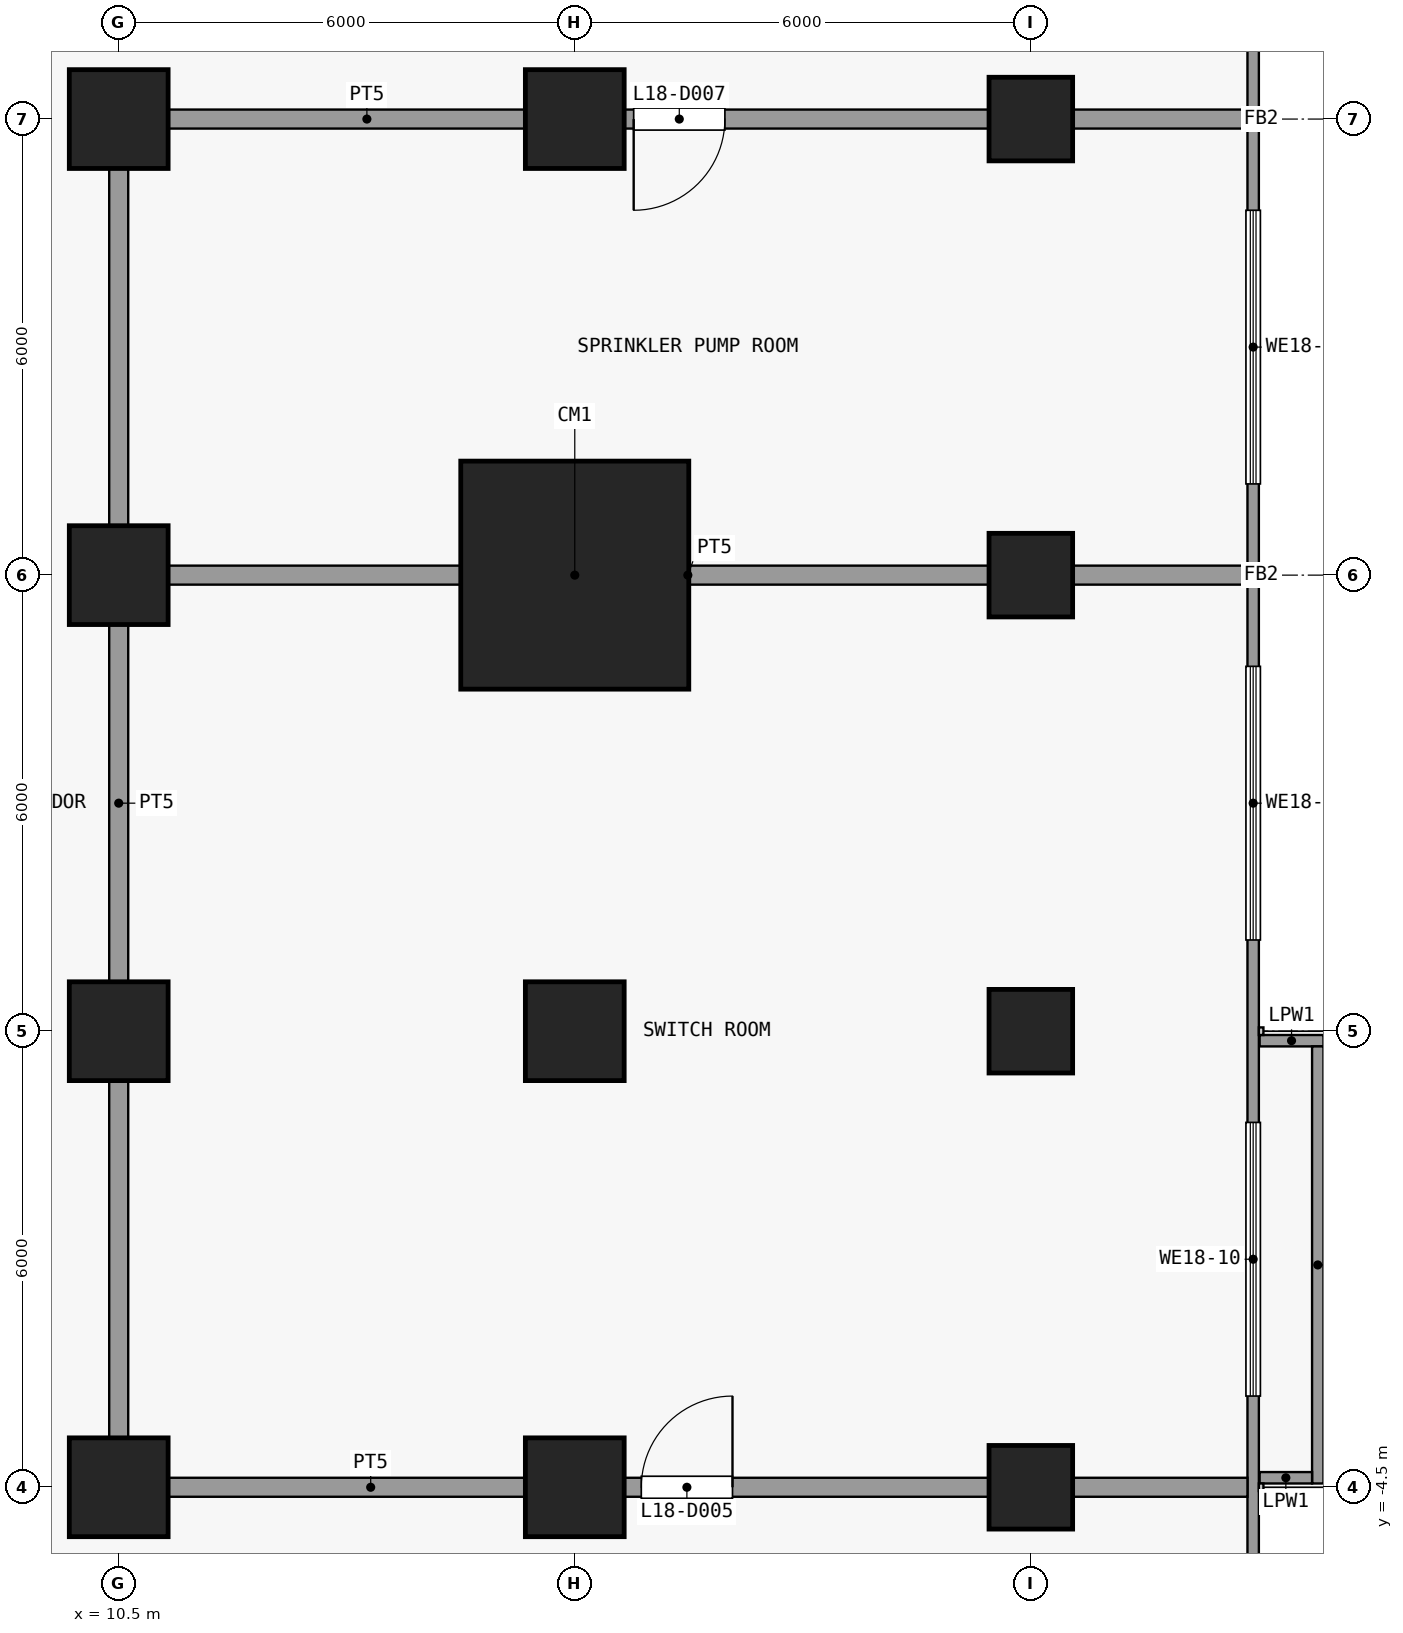
"""IFC4 building model, lengths in metres.
Left out: names, types, materials, properties, quantities, classifications, styles, units other than length and angle.
Written with IfcOpenShell. Run it as: python <this file> out.ifc"""

import sys

from ifc_helpers import new_model, si_unit, direction, frame, frame_2d, origin, origin_2d, place, context, subcontext, project, spatial, rectangle, extrude, element, fill, save


model = new_model("IFC4")
c1 = context("Model", 3, precision=1e-05, world=origin(), true_north=direction((0.0, 1.0)))
c2 = subcontext(c1, "Body", "Model", "MODEL_VIEW")
j1 = project(units=[si_unit("LENGTHUNIT", "METRE"), si_unit("PLANEANGLEUNIT", "RADIAN")], contexts=[c1])
p1 = place(None, origin())
s1 = spatial("IfcSite", under=j1, at=p1, CompositionType="ELEMENT")
p2 = place(p1, origin())
s2 = spatial("IfcBuilding", under=s1, at=p2, CompositionType="ELEMENT")
p3 = place(p2, frame((0.0, 0.0, 75.7)))
s3 = spatial("IfcBuildingStorey", under=s2, at=p3, CompositionType="ELEMENT", Elevation=75.7)
for number, where, z_axis, x_axis in (
    (1, (10.5, -4.5, 0.0), (0.0, 0.0, 1.0), (1.0, 0.0, 0.0)),
    (2, (10.5, 1.5, 0.0), (0.0, 0.0, 1.0), (1.0, 0.0, 0.0)),
    (3, (10.5, 7.5, 0.0), (0.0, 0.0, 1.0), (1.0, 0.0, 0.0)),
    (4, (10.5, 13.5, 0.0), (0.0, 0.0, 1.0), (1.0, 0.0, 0.0)),
    (5, (16.5, -4.5, 0.0), (0.0, 0.0, 1.0), (1.0, 0.0, 0.0)),
    (6, (16.5, 1.5, 0.0), (0.0, 0.0, 1.0), (1.0, 0.0, 0.0)),
):
    element("IfcColumn", number, at=place(p3, frame(where, z_axis=z_axis, x_axis=x_axis)), inside=s3, PredefinedType="COLUMN", context=c2, shape_type="SweptSolid", body=[
        extrude(rectangle(XDim=1.3, YDim=1.3, at=origin_2d()), origin(), (0.0, 0.0, 1.0), 5.4),
    ])
p4 = place(p3, frame((16.5, 7.5, 0.0), z_axis=(0.0, 0.0, 1.0), x_axis=(1.0, 0.0, 0.0)))
e7 = element("IfcColumn", 7, at=p4, inside=s3, PredefinedType="COLUMN", context=c2, shape_type="SweptSolid", body=[
    extrude(rectangle(XDim=3.0, YDim=3.0, at=origin_2d()), origin(), (0.0, 0.0, 1.0), 5.4),
])
p5 = place(p3, frame((16.5, 13.5, 0.0), z_axis=(0.0, 0.0, 1.0), x_axis=(1.0, 0.0, 0.0)))
e8 = element("IfcColumn", 8, at=p5, inside=s3, PredefinedType="COLUMN", context=c2, shape_type="SweptSolid", body=[
    extrude(rectangle(XDim=1.3, YDim=1.3, at=origin_2d()), origin(), (0.0, 0.0, 1.0), 5.4),
])
for number, where, z_axis, x_axis in (
    (9, (22.5, -4.5, 0.0), (0.0, 0.0, 1.0), (1.0, 0.0, 0.0)),
    (10, (22.5, 1.5, 0.0), (0.0, 0.0, 1.0), (1.0, 0.0, 0.0)),
    (11, (22.5, 7.5, 0.0), (0.0, 0.0, 1.0), (1.0, 0.0, 0.0)),
    (12, (22.5, 13.5, 0.0), (0.0, 0.0, 1.0), (1.0, 0.0, 0.0)),
):
    element("IfcColumn", number, at=place(p3, frame(where, z_axis=z_axis, x_axis=x_axis)), inside=s3, PredefinedType="COLUMN", context=c2, shape_type="SweptSolid", body=[
        extrude(rectangle(XDim=1.1, YDim=1.1, at=origin_2d()), origin(), (0.0, 0.0, 1.0), 5.4),
    ])
p6 = place(p3, frame((25.425, 25.35, 0.0), z_axis=(0.0, 0.0, 1.0), x_axis=(0.0, -1.0, 0.0)))
e13 = element("IfcWall", 13, at=p6, inside=s3, PredefinedType="SOLIDWALL", context=c2, shape_type="SweptSolid", body=[
    extrude(rectangle(XDim=47.7, YDim=0.15, at=frame_2d((23.85, 0.0))), origin(), (0.0, 0.0, 1.0), 5.0),
])
p7 = place(p6, frame((41.475, 0.0, 1.2)))
e14 = element("IfcOpeningElement", 14, at=p7, cuts=e13, PredefinedType="OPENING", context=c2, shape_type="SweptSolid", body=[
    extrude(rectangle(XDim=3.6, YDim=3.0, at=frame_2d((1.8, 1.5))), frame((0.0, 0.085, 0.0), z_axis=(0.0, -1.0, 0.0), x_axis=(1.0, 0.0, 0.0)), (0.0, 0.0, 1.0), 0.17),
])
p8 = place(p6, frame((33.525, 0.0, 1.2)))
e15 = element("IfcOpeningElement", 15, at=p8, cuts=e13, PredefinedType="OPENING", context=c2, shape_type="SweptSolid", body=[
    extrude(rectangle(XDim=2.625, YDim=3.0, at=frame_2d((1.312, 1.5))), frame((0.0, 0.085, 0.0), z_axis=(0.0, -1.0, 0.0), x_axis=(1.0, 0.0, 0.0)), (0.0, 0.0, 1.0), 0.17),
])
p9 = place(p6, frame((25.05, 0.0, 1.2)))
e16 = element("IfcOpeningElement", 16, at=p9, cuts=e13, PredefinedType="OPENING", context=c2, shape_type="SweptSolid", body=[
    extrude(rectangle(XDim=3.6, YDim=3.0, at=frame_2d((1.8, 1.5))), frame((0.0, 0.085, 0.0), z_axis=(0.0, -1.0, 0.0), x_axis=(1.0, 0.0, 0.0)), (0.0, 0.0, 1.0), 0.17),
])
p10 = place(p6, frame((19.05, 0.0, 1.2)))
e17 = element("IfcOpeningElement", 17, at=p10, cuts=e13, PredefinedType="OPENING", context=c2, shape_type="SweptSolid", body=[
    extrude(rectangle(XDim=3.6, YDim=3.0, at=frame_2d((1.8, 1.5))), frame((0.0, 0.085, 0.0), z_axis=(0.0, -1.0, 0.0), x_axis=(1.0, 0.0, 0.0)), (0.0, 0.0, 1.0), 0.17),
])
p11 = place(p6, frame((13.05, 0.0, 1.2)))
e18 = element("IfcOpeningElement", 18, at=p11, cuts=e13, PredefinedType="OPENING", context=c2, shape_type="SweptSolid", body=[
    extrude(rectangle(XDim=3.6, YDim=3.0, at=frame_2d((1.8, 1.5))), frame((0.0, 0.085, 0.0), z_axis=(0.0, -1.0, 0.0), x_axis=(1.0, 0.0, 0.0)), (0.0, 0.0, 1.0), 0.17),
])
p12 = place(p6, frame((9.125, 0.0, 1.2)))
e19 = element("IfcOpeningElement", 19, at=p12, cuts=e13, PredefinedType="OPENING", context=c2, shape_type="SweptSolid", body=[
    extrude(rectangle(XDim=1.525, YDim=3.0, at=frame_2d((0.762, 1.5))), frame((0.0, 0.085, 0.0), z_axis=(0.0, -1.0, 0.0), x_axis=(1.0, 0.0, 0.0)), (0.0, 0.0, 1.0), 0.17),
])
p13 = place(p6, frame((7.05, 0.0, 1.2)))
e20 = element("IfcOpeningElement", 20, at=p13, cuts=e13, PredefinedType="OPENING", context=c2, shape_type="SweptSolid", body=[
    extrude(rectangle(XDim=1.525, YDim=3.0, at=frame_2d((0.762, 1.5))), frame((0.0, 0.085, 0.0), z_axis=(0.0, -1.0, 0.0), x_axis=(1.0, 0.0, 0.0)), (0.0, 0.0, 1.0), 0.17),
])
p14 = place(p6, frame((1.125, 0.0, 1.2)))
e21 = element("IfcOpeningElement", 21, at=p14, cuts=e13, PredefinedType="OPENING", context=c2, shape_type="SweptSolid", body=[
    extrude(rectangle(XDim=3.6, YDim=3.0, at=frame_2d((1.8, 1.5))), frame((0.0, 0.085, 0.0), z_axis=(0.0, -1.0, 0.0), x_axis=(1.0, 0.0, 0.0)), (0.0, 0.0, 1.0), 0.17),
])
p15 = place(p3, frame((25.51, 1.375, 0.0), z_axis=(0.0, 0.0, 1.0), x_axis=(1.0, 0.0, 0.0)))
e22 = element("IfcWall", 22, at=p15, inside=s3, PredefinedType="PARAPET", context=c2, shape_type="SweptSolid", body=[
    extrude(rectangle(XDim=0.84, YDim=0.15, at=frame_2d((0.42, 0.0))), origin(), (0.0, 0.0, 1.0), 1.15),
])
p16 = place(p3, frame((26.275, 1.3, 0.0), z_axis=(0.0, 0.0, 1.0), x_axis=(0.0, -1.0, 0.0)))
e23 = element("IfcWall", 23, at=p16, inside=s3, PredefinedType="PARAPET", context=c2, shape_type="SweptSolid", body=[
    extrude(rectangle(XDim=5.75, YDim=0.15, at=frame_2d((2.875, 0.0))), origin(), (0.0, 0.0, 1.0), 1.15),
])
p17 = place(p3, frame((26.2, -4.375, 0.0), z_axis=(0.0, 0.0, 1.0), x_axis=(-1.0, 0.0, 0.0)))
e24 = element("IfcWall", 24, at=p17, inside=s3, PredefinedType="PARAPET", context=c2, shape_type="SweptSolid", body=[
    extrude(rectangle(XDim=0.69, YDim=0.15, at=frame_2d((0.345, 0.0))), origin(), (0.0, 0.0, 1.0), 1.15),
])
p18 = place(p3, frame((10.375, -4.5, 0.0), z_axis=(0.0, 0.0, 1.0), x_axis=(1.0, 0.0, 0.0)))
e25 = element("IfcWall", 25, at=p18, inside=s3, PredefinedType="PARTITIONING", context=c2, shape_type="SweptSolid", body=[
    extrude(rectangle(XDim=14.975, YDim=0.25, at=frame_2d((7.488, 0.0))), origin(), (0.0, 0.0, 1.0), 5.0),
])
p19 = place(p18, frame((7.0, 0.0, 0.0)))
e26 = element("IfcOpeningElement", 26, at=p19, cuts=e25, PredefinedType="OPENING", context=c2, shape_type="SweptSolid", body=[
    extrude(rectangle(XDim=1.2, YDim=2.1, at=frame_2d((0.6, 1.05))), frame((0.0, 0.135, 0.0), z_axis=(0.0, -1.0, 0.0), x_axis=(1.0, 0.0, 0.0)), (0.0, 0.0, 1.0), 0.27),
])
p20 = place(p3, frame((10.625, 7.5, 0.0), z_axis=(0.0, 0.0, 1.0), x_axis=(1.0, 0.0, 0.0)))
e27 = element("IfcWall", 27, at=p20, inside=s3, PredefinedType="PARTITIONING", context=c2, shape_type="SweptSolid", body=[
    extrude(rectangle(XDim=14.725, YDim=0.25, at=frame_2d((7.363, 0.0))), origin(), (0.0, 0.0, 1.0), 5.0),
])
p21 = place(p3, frame((10.375, 13.5, 0.0), z_axis=(0.0, 0.0, 1.0), x_axis=(1.0, 0.0, 0.0)))
e28 = element("IfcWall", 28, at=p21, inside=s3, PredefinedType="PARTITIONING", context=c2, shape_type="SweptSolid", body=[
    extrude(rectangle(XDim=14.975, YDim=0.25, at=frame_2d((7.488, 0.0))), origin(), (0.0, 0.0, 1.0), 5.0),
])
p22 = place(p21, frame((6.9, 0.0, 0.0)))
e29 = element("IfcOpeningElement", 29, at=p22, cuts=e28, PredefinedType="OPENING", context=c2, shape_type="SweptSolid", body=[
    extrude(rectangle(XDim=1.2, YDim=2.1, at=frame_2d((0.6, 1.05))), frame((0.0, 0.135, 0.0), z_axis=(0.0, -1.0, 0.0), x_axis=(1.0, 0.0, 0.0)), (0.0, 0.0, 1.0), 0.27),
])
p23 = place(p3, frame((10.5, -4.375, 0.0), z_axis=(0.0, 0.0, 1.0), x_axis=(0.0, 1.0, 0.0)))
e30 = element("IfcWall", 30, at=p23, inside=s3, PredefinedType="PARTITIONING", context=c2, shape_type="SweptSolid", body=[
    extrude(rectangle(XDim=17.75, YDim=0.25, at=frame_2d((8.875, 0.0))), origin(), (0.0, 0.0, 1.0), 5.0),
])
p24 = place(p9, origin())
e31 = element("IfcWindow", 31, at=p24, inside=s3, PartitioningType="SINGLE_PANEL", PredefinedType="WINDOW", context=c2, shape_type="SweptSolid", body=[
    extrude(rectangle(XDim=3.6, YDim=3.0, at=frame_2d((1.8, 1.5))), frame((0.0, 0.03, 0.0), z_axis=(0.0, -1.0, 0.0), x_axis=(1.0, 0.0, 0.0)), (0.0, 0.0, 1.0), 0.06),
])
fill(e16, e31)
p25 = place(p10, origin())
e32 = element("IfcWindow", 32, at=p25, inside=s3, PartitioningType="SINGLE_PANEL", PredefinedType="WINDOW", context=c2, shape_type="SweptSolid", body=[
    extrude(rectangle(XDim=3.6, YDim=3.0, at=frame_2d((1.8, 1.5))), frame((0.0, 0.03, 0.0), z_axis=(0.0, -1.0, 0.0), x_axis=(1.0, 0.0, 0.0)), (0.0, 0.0, 1.0), 0.06),
])
fill(e17, e32)
p26 = place(p11, origin())
e33 = element("IfcWindow", 33, at=p26, inside=s3, PartitioningType="SINGLE_PANEL", PredefinedType="WINDOW", context=c2, shape_type="SweptSolid", body=[
    extrude(rectangle(XDim=3.6, YDim=3.0, at=frame_2d((1.8, 1.5))), frame((0.0, 0.03, 0.0), z_axis=(0.0, -1.0, 0.0), x_axis=(1.0, 0.0, 0.0)), (0.0, 0.0, 1.0), 0.06),
])
fill(e18, e33)
p27 = place(p19, origin())
e34 = element("IfcDoor", 34, at=p27, inside=s3, OperationType="SINGLE_SWING_LEFT", PredefinedType="DOOR", context=c2, shape_type="SweptSolid", body=[
    extrude(rectangle(XDim=1.2, YDim=2.1, at=frame_2d((0.6, 1.05))), frame((0.0, 0.025, 0.0), z_axis=(0.0, -1.0, 0.0), x_axis=(1.0, 0.0, 0.0)), (0.0, 0.0, 1.0), 0.05),
])
fill(e26, e34)
p28 = place(p22, origin())
e35 = element("IfcDoor", 35, at=p28, inside=s3, OperationType="SINGLE_SWING_LEFT", PredefinedType="DOOR", context=c2, shape_type="SweptSolid", body=[
    extrude(rectangle(XDim=1.2, YDim=2.1, at=frame_2d((0.6, 1.05))), frame((0.0, 0.025, 0.0), z_axis=(0.0, -1.0, 0.0), x_axis=(1.0, 0.0, 0.0)), (0.0, 0.0, 1.0), 0.05),
])
fill(e29, e35)
save(model, sys.argv[1])
